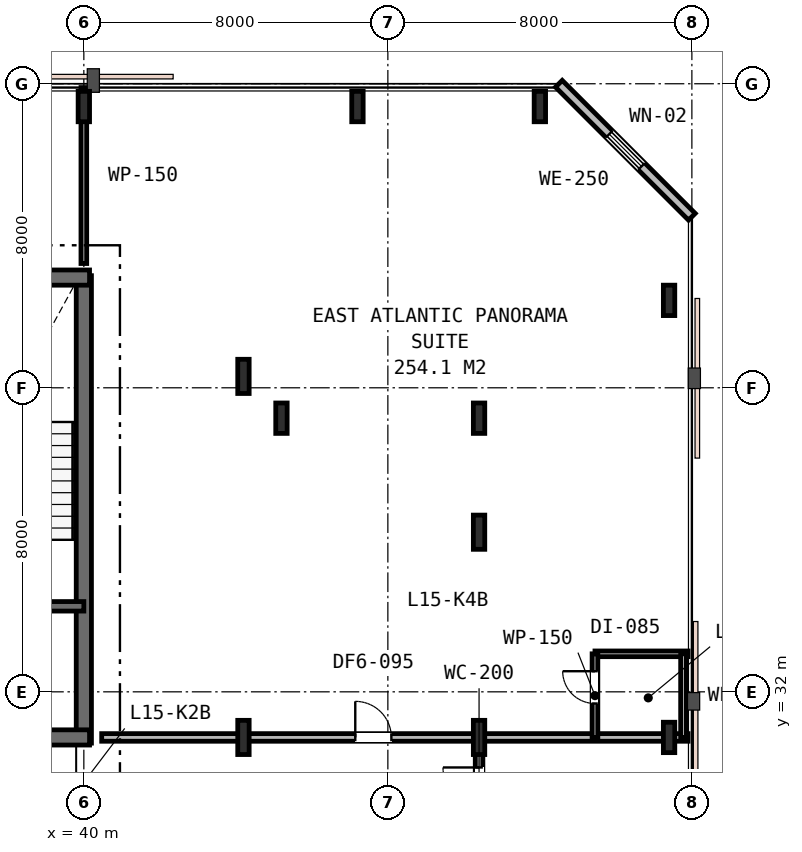
"""IFC4 building model, lengths in metres.
Left out: names, types, materials, properties, quantities, classifications, styles, units other than length and angle.
Written with IfcOpenShell. Run it as: python <this file> out.ifc"""

import sys

from ifc_helpers import new_model, si_unit, direction, frame, frame_2d, origin, origin_2d, place, context, subcontext, project, spatial, rectangle, i_section, extrude, element, fill, save


model = new_model("IFC4")
c1 = context("Model", 3, precision=1e-05, world=origin(), true_north=direction((0.0, 1.0)))
c2 = subcontext(c1, "Body", "Model", "MODEL_VIEW")
j1 = project(units=[si_unit("LENGTHUNIT", "METRE"), si_unit("PLANEANGLEUNIT", "RADIAN")], contexts=[c1])
p1 = place(None, origin())
s1 = spatial("IfcSite", under=j1, at=p1, CompositionType="ELEMENT")
p2 = place(p1, origin())
s2 = spatial("IfcBuilding", under=s1, at=p2, CompositionType="ELEMENT")
p3 = place(p2, frame((0.0, 0.0, 61.8)))
s3 = spatial("IfcBuildingStorey", under=s2, at=p3, CompositionType="ELEMENT", Elevation=61.8)
p4 = place(p3, frame((40.0, 30.65, 0.0), z_axis=(0.0, 0.0, 1.0), x_axis=(0.0, 1.0, 0.0)))
e1 = element("IfcWall", 1, at=p4, inside=s3, PredefinedType="SHEAR", context=c2, shape_type="SweptSolid", body=[
    extrude(rectangle(XDim=12.3, YDim=0.4, at=frame_2d((6.15, 0.0))), origin(), (0.0, 0.0, 1.0), 3.6),
])
p5 = place(p3, frame((15.85, 42.9, 0.0), z_axis=(0.0, 0.0, 1.0), x_axis=(1.0, 0.0, 0.0)))
e2 = element("IfcWall", 2, at=p5, inside=s3, PredefinedType="SHEAR", context=c2, shape_type="SweptSolid", body=[
    extrude(rectangle(XDim=24.3, YDim=0.4, at=frame_2d((12.15, 0.0))), origin(), (0.0, 0.0, 1.0), 3.6),
])
p6 = place(p3, frame((28.95, 30.8, 0.0), z_axis=(0.0, 0.0, 1.0), x_axis=(1.0, 0.0, 0.0)))
e3 = element("IfcWall", 3, at=p6, inside=s3, PredefinedType="SHEAR", context=c2, shape_type="SweptSolid", body=[
    extrude(rectangle(XDim=11.2, YDim=0.4, at=frame_2d((5.6, 0.0))), origin(), (0.0, 0.0, 1.0), 3.6),
])
p7 = place(p6, frame((7.65, 0.0, 0.0)))
e4 = element("IfcOpeningElement", 4, at=p7, cuts=e3, PredefinedType="OPENING", context=c2, shape_type="SweptSolid", body=[
    extrude(rectangle(XDim=1.1, YDim=2.15, at=frame_2d((0.55, 1.075))), frame((0.0, 0.21, 0.0), z_axis=(0.0, -1.0, 0.0), x_axis=(1.0, 0.0, 0.0)), (0.0, 0.0, 1.0), 0.42),
])
p8 = place(p3, frame((33.95, 34.25, 0.0), z_axis=(0.0, 0.0, 1.0), x_axis=(1.0, 0.0, 0.0)))
e5 = element("IfcWall", 5, at=p8, inside=s3, PredefinedType="SHEAR", context=c2, shape_type="SweptSolid", body=[
    extrude(rectangle(XDim=6.05, YDim=0.25, at=frame_2d((3.025, 0.0))), origin(), (0.0, 0.0, 1.0), 3.6),
])
p9 = place(p8, frame((3.7, 0.0, 0.0)))
e6 = element("IfcOpeningElement", 6, at=p9, cuts=e5, PredefinedType="OPENING", context=c2, shape_type="SweptSolid", body=[
    extrude(rectangle(XDim=1.0, YDim=2.15, at=frame_2d((0.5, 1.075))), frame((0.0, 0.135, 0.0), z_axis=(0.0, -1.0, 0.0), x_axis=(1.0, 0.0, 0.0)), (0.0, 0.0, 1.0), 0.27),
])
p10 = place(p8, frame((0.55, 0.0, 0.0)))
e7 = element("IfcOpeningElement", 7, at=p10, cuts=e5, PredefinedType="OPENING", context=c2, shape_type="SweptSolid", body=[
    extrude(rectangle(XDim=1.1, YDim=2.15, at=frame_2d((0.55, 1.075))), frame((0.0, 0.135, 0.0), z_axis=(0.0, -1.0, 0.0), x_axis=(1.0, 0.0, 0.0)), (0.0, 0.0, 1.0), 0.27),
])
for number, where, z_axis, x_axis in (
    (8, (45.2, 39.2, 0.0), (0.0, 0.0, 1.0), (1.0, 0.0, 0.0)),
    (9, (40.0, 47.4, 0.0), (0.0, 0.0, 1.0), (1.0, 0.0, 0.0)),
    (10, (47.2, 47.4, 0.0), (0.0, 0.0, 1.0), (1.0, 0.0, 0.0)),
    (11, (50.4, 39.2, 0.0), (0.0, 0.0, 1.0), (1.0, 0.0, 0.0)),
    (12, (55.4, 30.8, 0.0), (0.0, 0.0, 1.0), (1.0, 0.0, 0.0)),
    (13, (55.4, 42.3, 0.0), (0.0, 0.0, 1.0), (1.0, 0.0, 0.0)),
    (14, (52.0, 47.4, 0.0), (0.0, 0.0, 1.0), (1.0, 0.0, 0.0)),
):
    element("IfcColumn", number, at=place(p3, frame(where, z_axis=z_axis, x_axis=x_axis)), inside=s3, PredefinedType="COLUMN", context=c2, shape_type="SweptSolid", body=[
        extrude(i_section(OverallWidth=0.3, OverallDepth=0.8, WebThickness=0.018, FlangeThickness=0.033, FilletRadius=0.03, at=origin_2d()), origin(), (0.0, 0.0, 1.0), 3.6),
    ])
for number, where, z_axis, x_axis in (
    (15, (44.2, 30.8, 0.0), (0.0, 0.0, 1.0), (1.0, 0.0, 0.0)),
    (16, (44.2, 40.3, 0.0), (0.0, 0.0, 1.0), (1.0, 0.0, 0.0)),
    (17, (50.4, 30.8, 0.0), (0.0, 0.0, 1.0), (1.0, 0.0, 0.0)),
    (18, (50.4, 36.2, 0.0), (0.0, 0.0, 1.0), (1.0, 0.0, 0.0)),
):
    element("IfcColumn", number, at=place(p3, frame(where, z_axis=z_axis, x_axis=x_axis)), inside=s3, PredefinedType="COLUMN", context=c2, shape_type="SweptSolid", body=[
        extrude(i_section(OverallWidth=0.3, OverallDepth=0.9, WebThickness=0.018, FlangeThickness=0.035, FilletRadius=0.03, at=origin_2d()), origin(), (0.0, 0.0, 1.0), 3.6),
    ])
p11 = place(p3, frame((56.0, 44.5, 0.0), z_axis=(0.0, 0.0, 1.0), x_axis=(-0.707106781187, 0.707106781187, 0.0)))
e19 = element("IfcWall", 19, at=p11, inside=s3, PredefinedType="STANDARD", context=c2, shape_type="SweptSolid", body=[
    extrude(rectangle(XDim=4.95, YDim=0.25, at=frame_2d((2.475, 0.0))), origin(), (0.0, 0.0, 1.0), 3.33),
])
p12 = place(p11, frame((1.875, 0.0, 0.85)))
e20 = element("IfcOpeningElement", 20, at=p12, cuts=e19, PredefinedType="OPENING", context=c2, shape_type="SweptSolid", body=[
    extrude(rectangle(XDim=1.2, YDim=1.6, at=frame_2d((0.6, 0.8))), frame((0.0, 0.135, 0.0), z_axis=(0.0, -1.0, 0.0), x_axis=(1.0, 0.0, 0.0)), (0.0, 0.0, 1.0), 0.27),
])
p13 = place(p3, frame((40.0, 43.27, 0.0), z_axis=(0.0, 0.0, 1.0), x_axis=(0.0, 1.0, 0.0)))
e21 = element("IfcWall", 21, at=p13, inside=s3, PredefinedType="PARTITIONING", context=c2, shape_type="SweptSolid", body=[
    extrude(rectangle(XDim=4.63, YDim=0.15, at=frame_2d((2.315, 0.0))), origin(), (0.0, 0.0, 1.0), 2.93),
])
p14 = place(p3, frame((40.47, 30.8, 0.0), z_axis=(0.0, 0.0, 1.0), x_axis=(1.0, 0.0, 0.0)))
e22 = element("IfcWall", 22, at=p14, inside=s3, PredefinedType="PARTITIONING", context=c2, shape_type="SweptSolid", body=[
    extrude(rectangle(XDim=15.43, YDim=0.2, at=frame_2d((7.715, 0.0))), origin(), (0.0, 0.0, 1.0), 2.82),
])
p15 = place(p14, frame((6.673, 0.0, 0.0)))
e23 = element("IfcOpeningElement", 23, at=p15, cuts=e22, PredefinedType="OPENING", context=c2, shape_type="SweptSolid", body=[
    extrude(rectangle(XDim=0.95, YDim=2.15, at=frame_2d((0.475, 1.075))), frame((0.0, 0.11, 0.0), z_axis=(0.0, -1.0, 0.0), x_axis=(1.0, 0.0, 0.0)), (0.0, 0.0, 1.0), 0.22),
])
p16 = place(p3, frame((53.45, 33.0, 0.0), z_axis=(0.0, 0.0, 1.0), x_axis=(1.0, 0.0, 0.0)))
e24 = element("IfcWall", 24, at=p16, inside=s3, PredefinedType="PARTITIONING", context=c2, shape_type="SweptSolid", body=[
    extrude(rectangle(XDim=2.45, YDim=0.15, at=frame_2d((1.225, 0.0))), origin(), (0.0, 0.0, 1.0), 2.93),
])
p17 = place(p3, frame((53.45, 30.8, 0.0), z_axis=(0.0, 0.0, 1.0), x_axis=(0.0, 1.0, 0.0)))
e25 = element("IfcWall", 25, at=p17, inside=s3, PredefinedType="PARTITIONING", context=c2, shape_type="SweptSolid", body=[
    extrude(rectangle(XDim=2.2, YDim=0.15, at=frame_2d((1.1, 0.0))), origin(), (0.0, 0.0, 1.0), 2.82),
])
p18 = place(p17, frame((0.892, 0.0, 0.0)))
e26 = element("IfcOpeningElement", 26, at=p18, cuts=e25, PredefinedType="OPENING", context=c2, shape_type="SweptSolid", body=[
    extrude(rectangle(XDim=0.85, YDim=2.15, at=frame_2d((0.425, 1.075))), frame((0.0, 0.085, 0.0), z_axis=(0.0, -1.0, 0.0), x_axis=(1.0, 0.0, 0.0)), (0.0, 0.0, 1.0), 0.17),
])
p19 = place(p3, frame((55.78, 33.0, 0.0), z_axis=(0.0, 0.0, 1.0), x_axis=(0.0, -1.0, 0.0)))
e27 = element("IfcWall", 27, at=p19, inside=s3, PredefinedType="PARTITIONING", context=c2, shape_type="SweptSolid", body=[
    extrude(rectangle(XDim=2.2, YDim=0.15, at=frame_2d((1.1, 0.0))), origin(), (0.0, 0.0, 1.0), 2.82),
])
p20 = place(p3, frame((50.4, 28.6, 0.0), z_axis=(0.0, 0.0, 1.0), x_axis=(0.0, 1.0, 0.0)))
e28 = element("IfcWall", 28, at=p20, inside=s3, PredefinedType="PARTITIONING", context=c2, shape_type="SweptSolid", body=[
    extrude(rectangle(XDim=2.2, YDim=0.2, at=frame_2d((1.1, 0.0))), origin(), (0.0, 0.0, 1.0), 2.82),
])
p21 = place(p20, frame((0.46, 0.0, 0.0)))
e29 = element("IfcOpeningElement", 29, at=p21, cuts=e28, PredefinedType="OPENING", context=c2, shape_type="SweptSolid", body=[
    extrude(rectangle(XDim=0.95, YDim=2.15, at=frame_2d((0.475, 1.075))), frame((0.0, 0.11, 0.0), z_axis=(0.0, -1.0, 0.0), x_axis=(1.0, 0.0, 0.0)), (0.0, 0.0, 1.0), 0.22),
])
p22 = place(p12, origin())
e30 = element("IfcWindow", 30, at=p22, inside=s3, PartitioningType="SINGLE_PANEL", PredefinedType="WINDOW", context=c2, shape_type="SweptSolid", body=[
    extrude(rectangle(XDim=1.2, YDim=1.6, at=frame_2d((0.6, 0.8))), frame((0.0, 0.03, 0.0), z_axis=(0.0, -1.0, 0.0), x_axis=(1.0, 0.0, 0.0)), (0.0, 0.0, 1.0), 0.06),
])
fill(e20, e30)
p23 = place(p15, origin())
e31 = element("IfcDoor", 31, at=p23, inside=s3, OperationType="SINGLE_SWING_LEFT", PredefinedType="DOOR", context=c2, shape_type="SweptSolid", body=[
    extrude(rectangle(XDim=0.95, YDim=2.15, at=frame_2d((0.475, 1.075))), frame((0.0, 0.025, 0.0), z_axis=(0.0, -1.0, 0.0), x_axis=(1.0, 0.0, 0.0)), (0.0, 0.0, 1.0), 0.05),
])
fill(e23, e31)
p24 = place(p18, origin())
e32 = element("IfcDoor", 32, at=p24, inside=s3, OperationType="SINGLE_SWING_RIGHT", PredefinedType="DOOR", context=c2, shape_type="SweptSolid", body=[
    extrude(rectangle(XDim=0.85, YDim=2.15, at=frame_2d((0.425, 1.075))), frame((0.0, 0.025, 0.0), z_axis=(0.0, -1.0, 0.0), x_axis=(1.0, 0.0, 0.0)), (0.0, 0.0, 1.0), 0.05),
])
fill(e26, e32)
p25 = place(p21, origin())
e33 = element("IfcDoor", 33, at=p25, inside=s3, OperationType="SINGLE_SWING_RIGHT", PredefinedType="DOOR", context=c2, shape_type="SweptSolid", body=[
    extrude(rectangle(XDim=0.95, YDim=2.15, at=frame_2d((0.475, 1.075))), frame((0.0, 0.025, 0.0), z_axis=(0.0, -1.0, 0.0), x_axis=(1.0, 0.0, 0.0)), (0.0, 0.0, 1.0), 0.05),
])
fill(e29, e33)
save(model, sys.argv[1])
